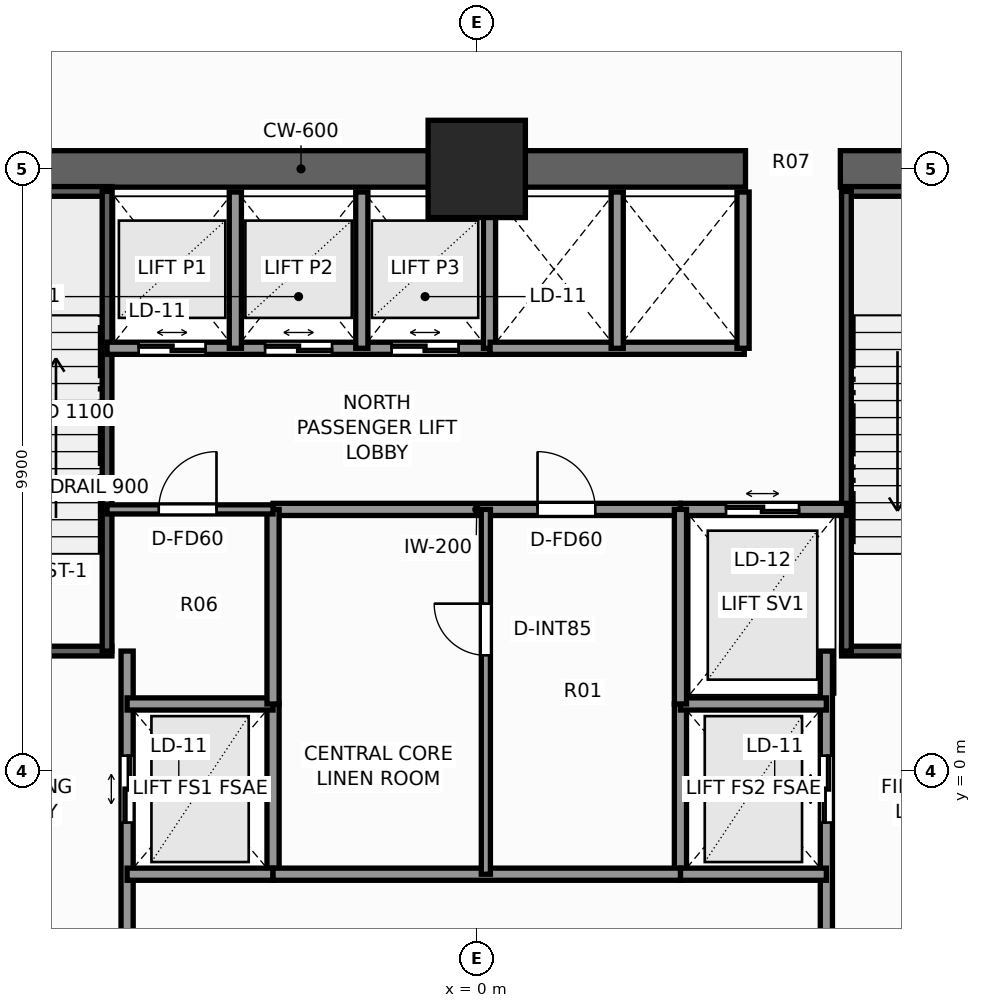
"""IFC4 building model, lengths in metres.
Left out: names, types, materials, properties, quantities, classifications, styles, units other than length and angle.
Written with IfcOpenShell. Run it as: python <this file> out.ifc"""

import sys

from ifc_helpers import new_model, si_unit, direction, frame, frame_2d, origin, origin_2d, place, context, subcontext, project, spatial, rectangle, extrude, element, fill, save


model = new_model("IFC4")
c1 = context("Model", 3, precision=1e-05, world=origin(), true_north=direction((0.0, 1.0)))
c2 = subcontext(c1, "Body", "Model", "MODEL_VIEW")
j1 = project(units=[si_unit("LENGTHUNIT", "METRE"), si_unit("PLANEANGLEUNIT", "RADIAN")], contexts=[c1])
p1 = place(None, origin())
s1 = spatial("IfcSite", under=j1, at=p1, CompositionType="ELEMENT")
p2 = place(p1, origin())
s2 = spatial("IfcBuilding", under=s1, at=p2, CompositionType="ELEMENT")
p3 = place(p2, frame((0.0, 0.0, 10.0)))
s3 = spatial("IfcBuildingStorey", under=s2, at=p3, CompositionType="ELEMENT", Elevation=10.0)
p4 = place(p3, frame((-10.2, 9.9, 0.0), z_axis=(0.0, 0.0, 1.0), x_axis=(1.0, 0.0, 0.0)))
e1 = element("IfcWall", 1, at=p4, inside=s3, PredefinedType="SHEAR", context=c2, shape_type="SweptSolid", body=[
    extrude(rectangle(XDim=14.62, YDim=0.6, at=frame_2d((7.31, 0.0))), origin(), (0.0, 0.0, 1.0), 5.2),
])
p5 = place(p3, frame((5.98, 9.9, 0.0), z_axis=(0.0, 0.0, 1.0), x_axis=(1.0, 0.0, 0.0)))
e2 = element("IfcWall", 2, at=p5, inside=s3, PredefinedType="SHEAR", context=c2, shape_type="SweptSolid", body=[
    extrude(rectangle(XDim=4.22, YDim=0.6, at=frame_2d((2.11, 0.0))), origin(), (0.0, 0.0, 1.0), 5.2),
])
p6 = place(p3, frame((0.0, 9.9, 0.0), z_axis=(0.0, 0.0, 1.0), x_axis=(1.0, 0.0, 0.0)))
e3 = element("IfcColumn", 3, at=p6, inside=s3, PredefinedType="COLUMN", context=c2, shape_type="SweptSolid", body=[
    extrude(rectangle(XDim=1.6, YDim=1.6, at=origin_2d()), origin(), (0.0, 0.0, 1.0), 5.2),
])
p7 = place(p3, frame((-9.52, 1.97, 0.0), z_axis=(0.0, 0.0, 1.0), x_axis=(1.0, 0.0, 0.0)))
e4 = element("IfcWall", 4, at=p7, inside=s3, PredefinedType="SHEAR", context=c2, shape_type="SweptSolid", body=[
    extrude(rectangle(XDim=3.52, YDim=0.16, at=frame_2d((1.76, 0.0))), origin(), (0.0, 0.0, 1.0), 5.2),
])
p8 = place(p7, frame((1.15, 0.0, 0.0)))
e5 = element("IfcOpeningElement", 5, at=p8, cuts=e4, PredefinedType="OPENING", context=c2, shape_type="SweptSolid", body=[
    extrude(rectangle(XDim=1.1, YDim=2.2, at=frame_2d((0.55, 1.1))), frame((0.0, 0.09, 0.0), z_axis=(0.0, -1.0, 0.0), x_axis=(1.0, 0.0, 0.0)), (0.0, 0.0, 1.0), 0.18),
])
p9 = place(p3, frame((-9.52, 9.53, 0.0), z_axis=(0.0, 0.0, 1.0), x_axis=(1.0, 0.0, 0.0)))
e6 = element("IfcWall", 6, at=p9, inside=s3, PredefinedType="SHEAR", context=c2, shape_type="SweptSolid", body=[
    extrude(rectangle(XDim=3.52, YDim=0.16, at=frame_2d((1.76, 0.0))), origin(), (0.0, 0.0, 1.0), 5.2),
])
p10 = place(p3, frame((-6.08, 1.97, 0.0), z_axis=(0.0, 0.0, 1.0), x_axis=(0.0, 1.0, 0.0)))
e7 = element("IfcWall", 7, at=p10, inside=s3, PredefinedType="SHEAR", context=c2, shape_type="SweptSolid", body=[
    extrude(rectangle(XDim=7.56, YDim=0.16, at=frame_2d((3.78, 0.0))), origin(), (0.0, 0.0, 1.0), 5.2),
])
p11 = place(p3, frame((6.0, 1.97, 0.0), z_axis=(0.0, 0.0, 1.0), x_axis=(1.0, 0.0, 0.0)))
e8 = element("IfcWall", 8, at=p11, inside=s3, PredefinedType="SHEAR", context=c2, shape_type="SweptSolid", body=[
    extrude(rectangle(XDim=3.52, YDim=0.16, at=frame_2d((1.76, 0.0))), origin(), (0.0, 0.0, 1.0), 5.2),
])
p12 = place(p11, frame((1.15, 0.0, 0.0)))
e9 = element("IfcOpeningElement", 9, at=p12, cuts=e8, PredefinedType="OPENING", context=c2, shape_type="SweptSolid", body=[
    extrude(rectangle(XDim=1.1, YDim=2.2, at=frame_2d((0.55, 1.1))), frame((0.0, 0.09, 0.0), z_axis=(0.0, -1.0, 0.0), x_axis=(1.0, 0.0, 0.0)), (0.0, 0.0, 1.0), 0.18),
])
p13 = place(p3, frame((6.0, 9.53, 0.0), z_axis=(0.0, 0.0, 1.0), x_axis=(1.0, 0.0, 0.0)))
e10 = element("IfcWall", 10, at=p13, inside=s3, PredefinedType="SHEAR", context=c2, shape_type="SweptSolid", body=[
    extrude(rectangle(XDim=3.52, YDim=0.16, at=frame_2d((1.76, 0.0))), origin(), (0.0, 0.0, 1.0), 5.2),
])
p14 = place(p3, frame((6.08, 1.97, 0.0), z_axis=(0.0, 0.0, 1.0), x_axis=(0.0, 1.0, 0.0)))
e11 = element("IfcWall", 11, at=p14, inside=s3, PredefinedType="SHEAR", context=c2, shape_type="SweptSolid", body=[
    extrude(rectangle(XDim=7.56, YDim=0.16, at=frame_2d((3.78, 0.0))), origin(), (0.0, 0.0, 1.0), 5.2),
])
p15 = place(p3, frame((-5.75, -3.6, 0.0), z_axis=(0.0, 0.0, 1.0), x_axis=(0.0, 1.0, 0.0)))
e12 = element("IfcWall", 12, at=p15, inside=s3, PredefinedType="SOLIDWALL", context=c2, shape_type="SweptSolid", body=[
    extrude(rectangle(XDim=5.57, YDim=0.2, at=frame_2d((2.785, 0.0))), origin(), (0.0, 0.0, 1.0), 4.92),
])
p16 = place(p15, frame((2.75, 0.0, 0.0)))
e13 = element("IfcOpeningElement", 13, at=p16, cuts=e12, PredefinedType="OPENING", context=c2, shape_type="SweptSolid", body=[
    extrude(rectangle(XDim=1.1, YDim=2.2, at=frame_2d((0.55, 1.1))), frame((0.0, 0.11, 0.0), z_axis=(0.0, -1.0, 0.0), x_axis=(1.0, 0.0, 0.0)), (0.0, 0.0, 1.0), 0.22),
])
p17 = place(p3, frame((-3.35, -1.7, 0.0), z_axis=(0.0, 0.0, 1.0), x_axis=(0.0, 1.0, 0.0)))
e14 = element("IfcWall", 14, at=p17, inside=s3, PredefinedType="SOLIDWALL", context=c2, shape_type="SweptSolid", body=[
    extrude(rectangle(XDim=2.8, YDim=0.2, at=frame_2d((1.4, 0.0))), origin(), (0.0, 0.0, 1.0), 4.92),
])
for number, where, z_axis, x_axis in (
    (15, (-5.75, -1.7, 0.0), (0.0, 0.0, 1.0), (1.0, 0.0, 0.0)),
    (16, (-5.75, 1.1, 0.0), (0.0, 0.0, 1.0), (1.0, 0.0, 0.0)),
):
    element("IfcWall", number, at=place(p3, frame(where, z_axis=z_axis, x_axis=x_axis)), inside=s3, PredefinedType="SOLIDWALL", context=c2, shape_type="SweptSolid", body=[
        extrude(rectangle(XDim=2.4, YDim=0.2, at=frame_2d((1.2, 0.0))), origin(), (0.0, 0.0, 1.0), 4.92),
    ])
p18 = place(p3, frame((5.75, -3.6, 0.0), z_axis=(0.0, 0.0, 1.0), x_axis=(0.0, 1.0, 0.0)))
e17 = element("IfcWall", 17, at=p18, inside=s3, PredefinedType="SOLIDWALL", context=c2, shape_type="SweptSolid", body=[
    extrude(rectangle(XDim=5.57, YDim=0.2, at=frame_2d((2.785, 0.0))), origin(), (0.0, 0.0, 1.0), 4.92),
])
p19 = place(p18, frame((2.75, 0.0, 0.0)))
e18 = element("IfcOpeningElement", 18, at=p19, cuts=e17, PredefinedType="OPENING", context=c2, shape_type="SweptSolid", body=[
    extrude(rectangle(XDim=1.1, YDim=2.2, at=frame_2d((0.55, 1.1))), frame((0.0, 0.11, 0.0), z_axis=(0.0, -1.0, 0.0), x_axis=(1.0, 0.0, 0.0)), (0.0, 0.0, 1.0), 0.22),
])
p20 = place(p3, frame((3.35, -1.7, 0.0), z_axis=(0.0, 0.0, 1.0), x_axis=(0.0, 1.0, 0.0)))
e19 = element("IfcWall", 19, at=p20, inside=s3, PredefinedType="SOLIDWALL", context=c2, shape_type="SweptSolid", body=[
    extrude(rectangle(XDim=2.8, YDim=0.2, at=frame_2d((1.4, 0.0))), origin(), (0.0, 0.0, 1.0), 4.92),
])
for number, where, z_axis, x_axis in (
    (20, (3.35, -1.7, 0.0), (0.0, 0.0, 1.0), (1.0, 0.0, 0.0)),
    (21, (3.35, 1.1, 0.0), (0.0, 0.0, 1.0), (1.0, 0.0, 0.0)),
):
    element("IfcWall", number, at=place(p3, frame(where, z_axis=z_axis, x_axis=x_axis)), inside=s3, PredefinedType="SOLIDWALL", context=c2, shape_type="SweptSolid", body=[
        extrude(rectangle(XDim=2.4, YDim=0.2, at=frame_2d((1.2, 0.0))), origin(), (0.0, 0.0, 1.0), 4.92),
    ])
p21 = place(p3, frame((3.35, 4.3, 0.0), z_axis=(0.0, 0.0, 1.0), x_axis=(1.0, 0.0, 0.0)))
e22 = element("IfcWall", 22, at=p21, inside=s3, PredefinedType="SOLIDWALL", context=c2, shape_type="SweptSolid", body=[
    extrude(rectangle(XDim=2.73, YDim=0.2, at=frame_2d((1.365, 0.0))), origin(), (0.0, 0.0, 1.0), 4.92),
])
p22 = place(p21, frame((0.75, 0.0, 0.0)))
e23 = element("IfcOpeningElement", 23, at=p22, cuts=e22, PredefinedType="OPENING", context=c2, shape_type="SweptSolid", body=[
    extrude(rectangle(XDim=1.2, YDim=2.25, at=frame_2d((0.6, 1.125))), frame((0.0, 0.11, 0.0), z_axis=(0.0, -1.0, 0.0), x_axis=(1.0, 0.0, 0.0)), (0.0, 0.0, 1.0), 0.22),
])
p23 = place(p3, frame((-6.08, 6.95, 0.0), z_axis=(0.0, 0.0, 1.0), x_axis=(1.0, 0.0, 0.0)))
e24 = element("IfcWall", 24, at=p23, inside=s3, PredefinedType="SOLIDWALL", context=c2, shape_type="SweptSolid", body=[
    extrude(rectangle(XDim=6.3, YDim=0.2, at=frame_2d((3.15, 0.0))), origin(), (0.0, 0.0, 1.0), 4.92),
])
p24 = place(p23, frame((0.52, 0.0, 0.0)))
e25 = element("IfcOpeningElement", 25, at=p24, cuts=e24, PredefinedType="OPENING", context=c2, shape_type="SweptSolid", body=[
    extrude(rectangle(XDim=1.1, YDim=2.2, at=frame_2d((0.55, 1.1))), frame((0.0, 0.11, 0.0), z_axis=(0.0, -1.0, 0.0), x_axis=(1.0, 0.0, 0.0)), (0.0, 0.0, 1.0), 0.22),
])
p25 = place(p23, frame((2.6, 0.0, 0.0)))
e26 = element("IfcOpeningElement", 26, at=p25, cuts=e24, PredefinedType="OPENING", context=c2, shape_type="SweptSolid", body=[
    extrude(rectangle(XDim=1.1, YDim=2.2, at=frame_2d((0.55, 1.1))), frame((0.0, 0.11, 0.0), z_axis=(0.0, -1.0, 0.0), x_axis=(1.0, 0.0, 0.0)), (0.0, 0.0, 1.0), 0.22),
])
p26 = place(p23, frame((4.68, 0.0, 0.0)))
e27 = element("IfcOpeningElement", 27, at=p26, cuts=e24, PredefinedType="OPENING", context=c2, shape_type="SweptSolid", body=[
    extrude(rectangle(XDim=1.1, YDim=2.2, at=frame_2d((0.55, 1.1))), frame((0.0, 0.11, 0.0), z_axis=(0.0, -1.0, 0.0), x_axis=(1.0, 0.0, 0.0)), (0.0, 0.0, 1.0), 0.22),
])
for number, where, z_axis, x_axis in (
    (28, (-3.97, 6.95, 0.0), (0.0, 0.0, 1.0), (0.0, 1.0, 0.0)),
    (29, (-1.89, 6.95, 0.0), (0.0, 0.0, 1.0), (0.0, 1.0, 0.0)),
    (30, (0.21, 6.95, 0.0), (0.0, 0.0, 1.0), (0.0, 1.0, 0.0)),
):
    element("IfcWall", number, at=place(p3, frame(where, z_axis=z_axis, x_axis=x_axis)), inside=s3, PredefinedType="SOLIDWALL", context=c2, shape_type="SweptSolid", body=[
        extrude(rectangle(XDim=2.57, YDim=0.2, at=frame_2d((1.285, 0.0))), origin(), (0.0, 0.0, 1.0), 4.92),
    ])
p27 = place(p3, frame((0.22, 6.95, 0.0), z_axis=(0.0, 0.0, 1.0), x_axis=(1.0, 0.0, 0.0)))
e31 = element("IfcWall", 31, at=p27, inside=s3, PredefinedType="SOLIDWALL", context=c2, shape_type="SweptSolid", body=[
    extrude(rectangle(XDim=4.18, YDim=0.2, at=frame_2d((2.09, 0.0))), origin(), (0.0, 0.0, 1.0), 4.92),
])
for number, where, z_axis, x_axis in (
    (32, (4.38, 6.95, 0.0), (0.0, 0.0, 1.0), (0.0, 1.0, 0.0)),
    (33, (2.31, 6.95, 0.0), (0.0, 0.0, 1.0), (0.0, 1.0, 0.0)),
):
    element("IfcWall", number, at=place(p3, frame(where, z_axis=z_axis, x_axis=x_axis)), inside=s3, PredefinedType="SOLIDWALL", context=c2, shape_type="SweptSolid", body=[
        extrude(rectangle(XDim=2.57, YDim=0.2, at=frame_2d((1.285, 0.0))), origin(), (0.0, 0.0, 1.0), 4.92),
    ])
p28 = place(p3, frame((-3.35, 4.3, 0.0), z_axis=(0.0, 0.0, 1.0), x_axis=(1.0, 0.0, 0.0)))
e34 = element("IfcWall", 34, at=p28, inside=s3, PredefinedType="SOLIDWALL", context=c2, shape_type="SweptSolid", body=[
    extrude(rectangle(XDim=6.7, YDim=0.2, at=frame_2d((3.35, 0.0))), origin(), (0.0, 0.0, 1.0), 4.92),
])
p29 = place(p28, frame((4.35, 0.0, 0.0)))
e35 = element("IfcOpeningElement", 35, at=p29, cuts=e34, PredefinedType="OPENING", context=c2, shape_type="SweptSolid", body=[
    extrude(rectangle(XDim=0.95, YDim=2.06, at=frame_2d((0.475, 1.03))), frame((0.0, 0.11, 0.0), z_axis=(0.0, -1.0, 0.0), x_axis=(1.0, 0.0, 0.0)), (0.0, 0.0, 1.0), 0.22),
])
p30 = place(p3, frame((-3.35, -1.7, 0.0), z_axis=(0.0, 0.0, 1.0), x_axis=(1.0, 0.0, 0.0)))
e36 = element("IfcWall", 36, at=p30, inside=s3, PredefinedType="SOLIDWALL", context=c2, shape_type="SweptSolid", body=[
    extrude(rectangle(XDim=6.7, YDim=0.2, at=frame_2d((3.35, 0.0))), origin(), (0.0, 0.0, 1.0), 4.92),
])
for number, where, z_axis, x_axis in (
    (37, (-3.35, 1.1, 0.0), (0.0, 0.0, 1.0), (0.0, 1.0, 0.0)),
    (38, (3.35, 1.1, 0.0), (0.0, 0.0, 1.0), (0.0, 1.0, 0.0)),
):
    element("IfcWall", number, at=place(p3, frame(where, z_axis=z_axis, x_axis=x_axis)), inside=s3, PredefinedType="SOLIDWALL", context=c2, shape_type="SweptSolid", body=[
        extrude(rectangle(XDim=3.2, YDim=0.2, at=frame_2d((1.6, 0.0))), origin(), (0.0, 0.0, 1.0), 4.92),
    ])
p31 = place(p3, frame((0.15, -1.7, 0.0), z_axis=(0.0, 0.0, 1.0), x_axis=(0.0, 1.0, 0.0)))
e39 = element("IfcWall", 39, at=p31, inside=s3, PredefinedType="PARTITIONING", context=c2, shape_type="SweptSolid", body=[
    extrude(rectangle(XDim=6.0, YDim=0.15, at=frame_2d((3.0, 0.0))), origin(), (0.0, 0.0, 1.0), 4.92),
])
p32 = place(p31, frame((3.6, 0.0, 0.0)))
e40 = element("IfcOpeningElement", 40, at=p32, cuts=e39, PredefinedType="OPENING", context=c2, shape_type="SweptSolid", body=[
    extrude(rectangle(XDim=0.85, YDim=2.03, at=frame_2d((0.425, 1.015))), frame((0.0, 0.085, 0.0), z_axis=(0.0, -1.0, 0.0), x_axis=(1.0, 0.0, 0.0)), (0.0, 0.0, 1.0), 0.17),
])
p33 = place(p3, frame((-6.08, 4.3, 0.0), z_axis=(0.0, 0.0, 1.0), x_axis=(1.0, 0.0, 0.0)))
e41 = element("IfcWall", 41, at=p33, inside=s3, PredefinedType="PARTITIONING", context=c2, shape_type="SweptSolid", body=[
    extrude(rectangle(XDim=2.73, YDim=0.15, at=frame_2d((1.365, 0.0))), origin(), (0.0, 0.0, 1.0), 4.92),
])
p34 = place(p33, frame((0.85, 0.0, 0.0)))
e42 = element("IfcOpeningElement", 42, at=p34, cuts=e41, PredefinedType="OPENING", context=c2, shape_type="SweptSolid", body=[
    extrude(rectangle(XDim=0.95, YDim=2.06, at=frame_2d((0.475, 1.03))), frame((0.0, 0.085, 0.0), z_axis=(0.0, -1.0, 0.0), x_axis=(1.0, 0.0, 0.0)), (0.0, 0.0, 1.0), 0.17),
])
p35 = place(p16, origin())
e43 = element("IfcDoor", 43, at=p35, inside=s3, OperationType="DOUBLE_DOOR_SLIDING", PredefinedType="DOOR", context=c2, shape_type="SweptSolid", body=[
    extrude(rectangle(XDim=1.1, YDim=2.2, at=frame_2d((0.55, 1.1))), frame((0.0, 0.025, 0.0), z_axis=(0.0, -1.0, 0.0), x_axis=(1.0, 0.0, 0.0)), (0.0, 0.0, 1.0), 0.05),
])
fill(e13, e43)
p36 = place(p19, origin())
e44 = element("IfcDoor", 44, at=p36, inside=s3, OperationType="DOUBLE_DOOR_SLIDING", PredefinedType="DOOR", context=c2, shape_type="SweptSolid", body=[
    extrude(rectangle(XDim=1.1, YDim=2.2, at=frame_2d((0.55, 1.1))), frame((0.0, 0.025, 0.0), z_axis=(0.0, -1.0, 0.0), x_axis=(1.0, 0.0, 0.0)), (0.0, 0.0, 1.0), 0.05),
])
fill(e18, e44)
p37 = place(p22, origin())
e45 = element("IfcDoor", 45, at=p37, inside=s3, OperationType="DOUBLE_DOOR_SLIDING", PredefinedType="DOOR", context=c2, shape_type="SweptSolid", body=[
    extrude(rectangle(XDim=1.2, YDim=2.25, at=frame_2d((0.6, 1.125))), frame((0.0, 0.025, 0.0), z_axis=(0.0, -1.0, 0.0), x_axis=(1.0, 0.0, 0.0)), (0.0, 0.0, 1.0), 0.05),
])
fill(e23, e45)
p38 = place(p24, origin())
e46 = element("IfcDoor", 46, at=p38, inside=s3, OperationType="DOUBLE_DOOR_SLIDING", PredefinedType="DOOR", context=c2, shape_type="SweptSolid", body=[
    extrude(rectangle(XDim=1.1, YDim=2.2, at=frame_2d((0.55, 1.1))), frame((0.0, 0.025, 0.0), z_axis=(0.0, -1.0, 0.0), x_axis=(1.0, 0.0, 0.0)), (0.0, 0.0, 1.0), 0.05),
])
fill(e25, e46)
p39 = place(p25, origin())
e47 = element("IfcDoor", 47, at=p39, inside=s3, OperationType="DOUBLE_DOOR_SLIDING", PredefinedType="DOOR", context=c2, shape_type="SweptSolid", body=[
    extrude(rectangle(XDim=1.1, YDim=2.2, at=frame_2d((0.55, 1.1))), frame((0.0, 0.025, 0.0), z_axis=(0.0, -1.0, 0.0), x_axis=(1.0, 0.0, 0.0)), (0.0, 0.0, 1.0), 0.05),
])
fill(e26, e47)
p40 = place(p26, origin())
e48 = element("IfcDoor", 48, at=p40, inside=s3, OperationType="DOUBLE_DOOR_SLIDING", PredefinedType="DOOR", context=c2, shape_type="SweptSolid", body=[
    extrude(rectangle(XDim=1.1, YDim=2.2, at=frame_2d((0.55, 1.1))), frame((0.0, 0.025, 0.0), z_axis=(0.0, -1.0, 0.0), x_axis=(1.0, 0.0, 0.0)), (0.0, 0.0, 1.0), 0.05),
])
fill(e27, e48)
p41 = place(p29, origin())
e49 = element("IfcDoor", 49, at=p41, inside=s3, OperationType="SINGLE_SWING_LEFT", PredefinedType="DOOR", context=c2, shape_type="SweptSolid", body=[
    extrude(rectangle(XDim=0.95, YDim=2.06, at=frame_2d((0.475, 1.03))), frame((0.0, 0.025, 0.0), z_axis=(0.0, -1.0, 0.0), x_axis=(1.0, 0.0, 0.0)), (0.0, 0.0, 1.0), 0.05),
])
fill(e35, e49)
p42 = place(p32, origin())
e50 = element("IfcDoor", 50, at=p42, inside=s3, OperationType="SINGLE_SWING_RIGHT", PredefinedType="DOOR", context=c2, shape_type="SweptSolid", body=[
    extrude(rectangle(XDim=0.85, YDim=2.03, at=frame_2d((0.425, 1.015))), frame((0.0, 0.025, 0.0), z_axis=(0.0, -1.0, 0.0), x_axis=(1.0, 0.0, 0.0)), (0.0, 0.0, 1.0), 0.05),
])
fill(e40, e50)
p43 = place(p34, origin())
e51 = element("IfcDoor", 51, at=p43, inside=s3, OperationType="SINGLE_SWING_RIGHT", PredefinedType="DOOR", context=c2, shape_type="SweptSolid", body=[
    extrude(rectangle(XDim=0.95, YDim=2.06, at=frame_2d((0.475, 1.03))), frame((0.0, 0.025, 0.0), z_axis=(0.0, -1.0, 0.0), x_axis=(1.0, 0.0, 0.0)), (0.0, 0.0, 1.0), 0.05),
])
fill(e42, e51)
save(model, sys.argv[1])
